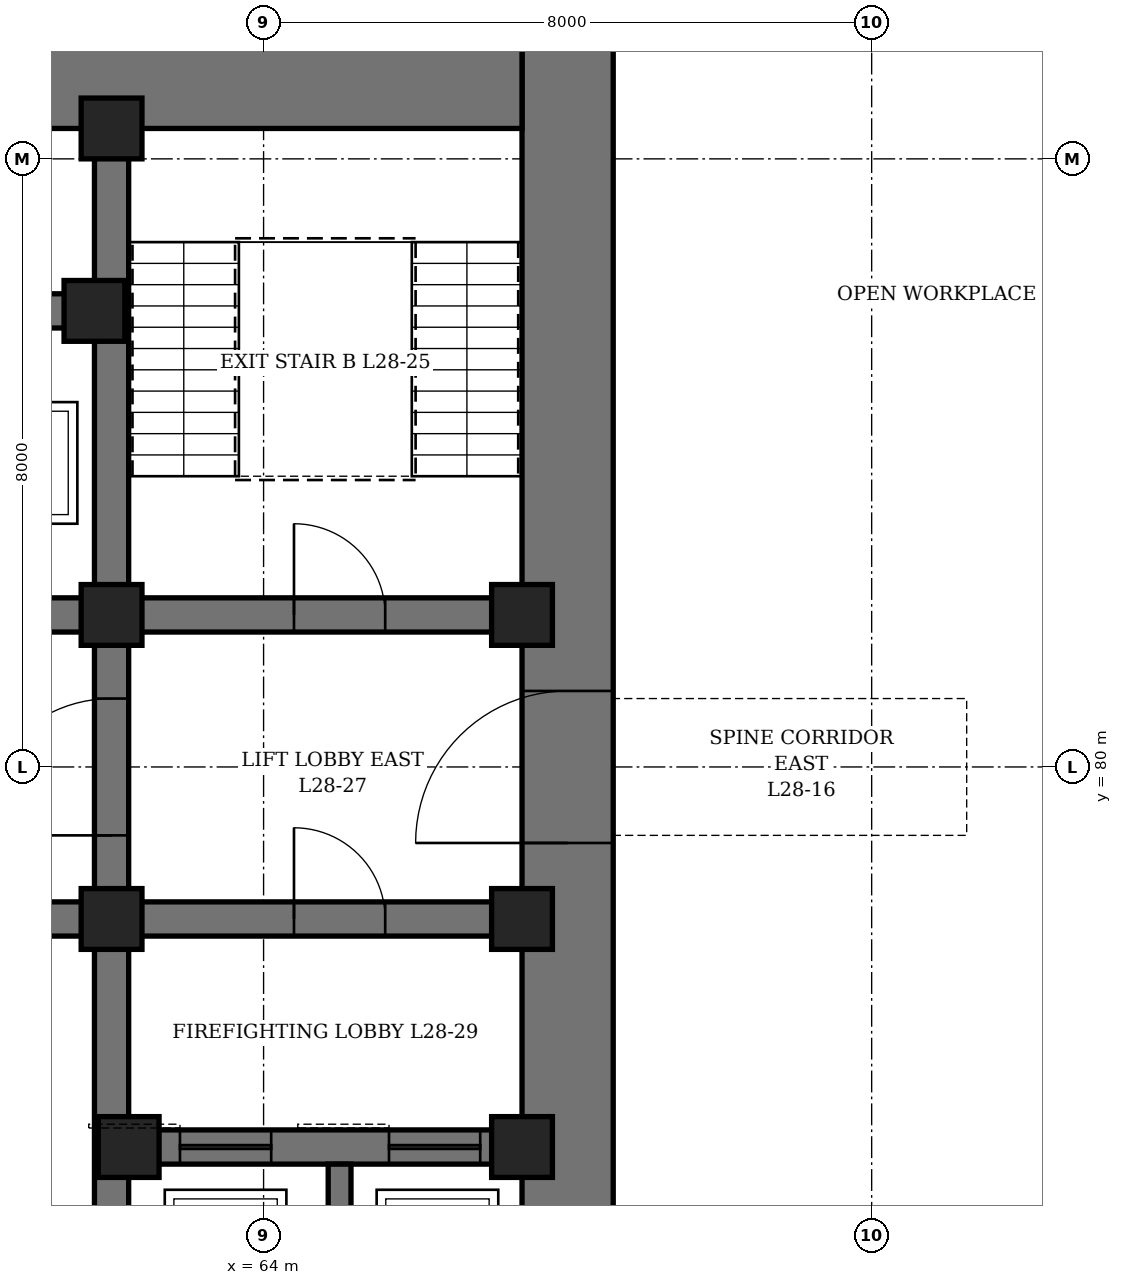
"""IFC4 building model, lengths in metres.
Left out: names, types, materials, properties, quantities, classifications, styles, units other than length and angle.
Written with IfcOpenShell. Run it as: python <this file> out.ifc"""

import sys

from ifc_helpers import new_model, si_unit, direction, frame, frame_2d, origin, origin_2d, place, context, subcontext, project, spatial, rectangle, hollow_rectangle, extrude, element, fill, save


model = new_model("IFC4")
c1 = context("Model", 3, precision=1e-05, world=origin(), true_north=direction((0.0, 1.0)))
c2 = subcontext(c1, "Body", "Model", "MODEL_VIEW")
j1 = project(units=[si_unit("LENGTHUNIT", "METRE"), si_unit("PLANEANGLEUNIT", "RADIAN")], contexts=[c1])
p1 = place(None, origin())
s1 = spatial("IfcSite", under=j1, at=p1, CompositionType="ELEMENT")
p2 = place(p1, origin())
s2 = spatial("IfcBuilding", under=s1, at=p2, CompositionType="ELEMENT")
p3 = place(p2, frame((0.0, 0.0, 129.1)))
s3 = spatial("IfcBuildingStorey", under=s2, at=p3, CompositionType="ELEMENT", Elevation=129.1)
p4 = place(p3, frame((68.0, 70.4, 0.0), z_axis=(0.0, 0.0, 1.0), x_axis=(0.0, 1.0, 0.0)))
e1 = element("IfcWall", 1, at=p4, inside=s3, PredefinedType="SHEAR", context=c2, shape_type="SweptSolid", body=[
    extrude(rectangle(XDim=19.2, YDim=1.2, at=frame_2d((9.6, 0.0))), origin(), (0.0, 0.0, 1.0), 4.2),
])
p5 = place(p4, frame((8.6, 0.0, 0.0)))
e2 = element("IfcOpeningElement", 2, at=p5, cuts=e1, PredefinedType="OPENING", context=c2, shape_type="SweptSolid", body=[
    extrude(rectangle(XDim=2.0, YDim=2.4, at=frame_2d((1.0, 1.2))), frame((0.0, 0.61, 0.0), z_axis=(0.0, -1.0, 0.0), x_axis=(1.0, 0.0, 0.0)), (0.0, 0.0, 1.0), 1.22),
])
p6 = place(p3, frame((44.6, 89.0, 0.0), z_axis=(0.0, 0.0, 1.0), x_axis=(1.0, 0.0, 0.0)))
e3 = element("IfcWall", 3, at=p6, inside=s3, PredefinedType="SHEAR", context=c2, shape_type="SweptSolid", body=[
    extrude(rectangle(XDim=22.8, YDim=1.2, at=frame_2d((11.4, 0.0))), origin(), (0.0, 0.0, 1.0), 4.2),
])
p7 = place(p6, frame((7.9, 0.0, 0.0)))
e4 = element("IfcOpeningElement", 4, at=p7, cuts=e3, PredefinedType="OPENING", context=c2, shape_type="SweptSolid", body=[
    extrude(rectangle(XDim=1.0, YDim=2.1, at=frame_2d((0.5, 1.05))), frame((0.0, 0.61, 0.0), z_axis=(0.0, -1.0, 0.0), x_axis=(1.0, 0.0, 0.0)), (0.0, 0.0, 1.0), 1.22),
])
p8 = place(p6, frame((12.025, 0.0, 0.0)))
e5 = element("IfcOpeningElement", 5, at=p8, cuts=e3, PredefinedType="OPENING", context=c2, shape_type="SweptSolid", body=[
    extrude(rectangle(XDim=0.9, YDim=2.1, at=frame_2d((0.45, 1.05))), frame((0.0, 0.61, 0.0), z_axis=(0.0, -1.0, 0.0), x_axis=(1.0, 0.0, 0.0)), (0.0, 0.0, 1.0), 1.22),
])
p9 = place(p6, frame((13.962, 0.0, 0.0)))
e6 = element("IfcOpeningElement", 6, at=p9, cuts=e3, PredefinedType="OPENING", context=c2, shape_type="SweptSolid", body=[
    extrude(rectangle(XDim=0.9, YDim=2.1, at=frame_2d((0.45, 1.05))), frame((0.0, 0.61, 0.0), z_axis=(0.0, -1.0, 0.0), x_axis=(1.0, 0.0, 0.0)), (0.0, 0.0, 1.0), 1.22),
])
p10 = place(p3, frame((62.0, 71.6, 0.0), z_axis=(0.0, 0.0, 1.0), x_axis=(0.0, 1.0, 0.0)))
e7 = element("IfcWall", 7, at=p10, inside=s3, PredefinedType="SHEAR", context=c2, shape_type="SweptSolid", body=[
    extrude(rectangle(XDim=16.8, YDim=0.45, at=frame_2d((8.4, 0.0))), origin(), (0.0, 0.0, 1.0), 4.2),
])
p11 = place(p10, frame((7.5, 0.0, 0.0)))
e8 = element("IfcOpeningElement", 8, at=p11, cuts=e7, PredefinedType="OPENING", context=c2, shape_type="SweptSolid", body=[
    extrude(rectangle(XDim=1.8, YDim=2.4, at=frame_2d((0.9, 1.2))), frame((0.0, 0.235, 0.0), z_axis=(0.0, -1.0, 0.0), x_axis=(1.0, 0.0, 0.0)), (0.0, 0.0, 1.0), 0.47),
])
p12 = place(p3, frame((62.225, 75.0, 0.0), z_axis=(0.0, 0.0, 1.0), x_axis=(1.0, 0.0, 0.0)))
e9 = element("IfcWall", 9, at=p12, inside=s3, PredefinedType="SHEAR", context=c2, shape_type="SweptSolid", body=[
    extrude(rectangle(XDim=5.175, YDim=0.45, at=frame_2d((2.587, 0.0))), origin(), (0.0, 0.0, 1.0), 4.2),
])
p13 = place(p12, frame((0.675, 0.0, 0.0)))
e10 = element("IfcOpeningElement", 10, at=p13, cuts=e9, PredefinedType="OPENING", context=c2, shape_type="SweptSolid", body=[
    extrude(rectangle(XDim=1.2, YDim=2.2, at=frame_2d((0.6, 1.1))), frame((0.0, 0.235, 0.0), z_axis=(0.0, -1.0, 0.0), x_axis=(1.0, 0.0, 0.0)), (0.0, 0.0, 1.0), 0.47),
])
p14 = place(p12, frame((3.425, 0.0, 0.0)))
e11 = element("IfcOpeningElement", 11, at=p14, cuts=e9, PredefinedType="OPENING", context=c2, shape_type="SweptSolid", body=[
    extrude(rectangle(XDim=1.2, YDim=2.2, at=frame_2d((0.6, 1.1))), frame((0.0, 0.235, 0.0), z_axis=(0.0, -1.0, 0.0), x_axis=(1.0, 0.0, 0.0)), (0.0, 0.0, 1.0), 0.47),
])
p15 = place(p3, frame((62.225, 78.0, 0.0), z_axis=(0.0, 0.0, 1.0), x_axis=(1.0, 0.0, 0.0)))
e12 = element("IfcWall", 12, at=p15, inside=s3, PredefinedType="SHEAR", context=c2, shape_type="SweptSolid", body=[
    extrude(rectangle(XDim=5.175, YDim=0.45, at=frame_2d((2.587, 0.0))), origin(), (0.0, 0.0, 1.0), 4.2),
])
p16 = place(p15, frame((2.175, 0.0, 0.0)))
e13 = element("IfcOpeningElement", 13, at=p16, cuts=e12, PredefinedType="OPENING", context=c2, shape_type="SweptSolid", body=[
    extrude(rectangle(XDim=1.2, YDim=2.1, at=frame_2d((0.6, 1.05))), frame((0.0, 0.235, 0.0), z_axis=(0.0, -1.0, 0.0), x_axis=(1.0, 0.0, 0.0)), (0.0, 0.0, 1.0), 0.47),
])
p17 = place(p3, frame((62.225, 82.0, 0.0), z_axis=(0.0, 0.0, 1.0), x_axis=(1.0, 0.0, 0.0)))
e14 = element("IfcWall", 14, at=p17, inside=s3, PredefinedType="SHEAR", context=c2, shape_type="SweptSolid", body=[
    extrude(rectangle(XDim=5.175, YDim=0.45, at=frame_2d((2.587, 0.0))), origin(), (0.0, 0.0, 1.0), 4.2),
])
p18 = place(p17, frame((2.175, 0.0, 0.0)))
e15 = element("IfcOpeningElement", 15, at=p18, cuts=e14, PredefinedType="OPENING", context=c2, shape_type="SweptSolid", body=[
    extrude(rectangle(XDim=1.2, YDim=2.1, at=frame_2d((0.6, 1.05))), frame((0.0, 0.235, 0.0), z_axis=(0.0, -1.0, 0.0), x_axis=(1.0, 0.0, 0.0)), (0.0, 0.0, 1.0), 0.47),
])
p19 = place(p3, frame((50.225, 78.0, 0.0), z_axis=(0.0, 0.0, 1.0), x_axis=(1.0, 0.0, 0.0)))
e16 = element("IfcWall", 16, at=p19, inside=s3, PredefinedType="SHEAR", context=c2, shape_type="SweptSolid", body=[
    extrude(rectangle(XDim=11.55, YDim=0.45, at=frame_2d((5.775, 0.0))), origin(), (0.0, 0.0, 1.0), 4.2),
])
p20 = place(p19, frame((0.825, 0.0, 0.0)))
e17 = element("IfcOpeningElement", 17, at=p20, cuts=e16, PredefinedType="OPENING", context=c2, shape_type="SweptSolid", body=[
    extrude(rectangle(XDim=0.9, YDim=2.1, at=frame_2d((0.45, 1.05))), frame((0.0, 0.235, 0.0), z_axis=(0.0, -1.0, 0.0), x_axis=(1.0, 0.0, 0.0)), (0.0, 0.0, 1.0), 0.47),
])
p21 = place(p19, frame((3.825, 0.0, 0.0)))
e18 = element("IfcOpeningElement", 18, at=p21, cuts=e16, PredefinedType="OPENING", context=c2, shape_type="SweptSolid", body=[
    extrude(rectangle(XDim=0.9, YDim=2.1, at=frame_2d((0.45, 1.05))), frame((0.0, 0.235, 0.0), z_axis=(0.0, -1.0, 0.0), x_axis=(1.0, 0.0, 0.0)), (0.0, 0.0, 1.0), 0.47),
])
p22 = place(p19, frame((6.825, 0.0, 0.0)))
e19 = element("IfcOpeningElement", 19, at=p22, cuts=e16, PredefinedType="OPENING", context=c2, shape_type="SweptSolid", body=[
    extrude(rectangle(XDim=0.9, YDim=2.1, at=frame_2d((0.45, 1.05))), frame((0.0, 0.235, 0.0), z_axis=(0.0, -1.0, 0.0), x_axis=(1.0, 0.0, 0.0)), (0.0, 0.0, 1.0), 0.47),
])
p23 = place(p19, frame((9.825, 0.0, 0.0)))
e20 = element("IfcOpeningElement", 20, at=p23, cuts=e16, PredefinedType="OPENING", context=c2, shape_type="SweptSolid", body=[
    extrude(rectangle(XDim=0.9, YDim=2.1, at=frame_2d((0.45, 1.05))), frame((0.0, 0.235, 0.0), z_axis=(0.0, -1.0, 0.0), x_axis=(1.0, 0.0, 0.0)), (0.0, 0.0, 1.0), 0.47),
])
p24 = place(p3, frame((50.225, 82.0, 0.0), z_axis=(0.0, 0.0, 1.0), x_axis=(1.0, 0.0, 0.0)))
e21 = element("IfcWall", 21, at=p24, inside=s3, PredefinedType="SHEAR", context=c2, shape_type="SweptSolid", body=[
    extrude(rectangle(XDim=11.55, YDim=0.45, at=frame_2d((5.775, 0.0))), origin(), (0.0, 0.0, 1.0), 4.2),
])
p25 = place(p24, frame((0.725, 0.0, 0.0)))
e22 = element("IfcOpeningElement", 22, at=p25, cuts=e21, PredefinedType="OPENING", context=c2, shape_type="SweptSolid", body=[
    extrude(rectangle(XDim=1.1, YDim=2.2, at=frame_2d((0.55, 1.1))), frame((0.0, 0.235, 0.0), z_axis=(0.0, -1.0, 0.0), x_axis=(1.0, 0.0, 0.0)), (0.0, 0.0, 1.0), 0.47),
])
p26 = place(p24, frame((3.725, 0.0, 0.0)))
e23 = element("IfcOpeningElement", 23, at=p26, cuts=e21, PredefinedType="OPENING", context=c2, shape_type="SweptSolid", body=[
    extrude(rectangle(XDim=1.1, YDim=2.2, at=frame_2d((0.55, 1.1))), frame((0.0, 0.235, 0.0), z_axis=(0.0, -1.0, 0.0), x_axis=(1.0, 0.0, 0.0)), (0.0, 0.0, 1.0), 0.47),
])
p27 = place(p24, frame((6.725, 0.0, 0.0)))
e24 = element("IfcOpeningElement", 24, at=p27, cuts=e21, PredefinedType="OPENING", context=c2, shape_type="SweptSolid", body=[
    extrude(rectangle(XDim=1.1, YDim=2.2, at=frame_2d((0.55, 1.1))), frame((0.0, 0.235, 0.0), z_axis=(0.0, -1.0, 0.0), x_axis=(1.0, 0.0, 0.0)), (0.0, 0.0, 1.0), 0.47),
])
p28 = place(p24, frame((9.725, 0.0, 0.0)))
e25 = element("IfcOpeningElement", 25, at=p28, cuts=e21, PredefinedType="OPENING", context=c2, shape_type="SweptSolid", body=[
    extrude(rectangle(XDim=1.1, YDim=2.2, at=frame_2d((0.55, 1.1))), frame((0.0, 0.235, 0.0), z_axis=(0.0, -1.0, 0.0), x_axis=(1.0, 0.0, 0.0)), (0.0, 0.0, 1.0), 0.47),
])
p29 = place(p3, frame((50.225, 86.0, 0.0), z_axis=(0.0, 0.0, 1.0), x_axis=(1.0, 0.0, 0.0)))
e26 = element("IfcWall", 26, at=p29, inside=s3, PredefinedType="SHEAR", context=c2, shape_type="SweptSolid", body=[
    extrude(rectangle(XDim=11.55, YDim=0.45, at=frame_2d((5.775, 0.0))), origin(), (0.0, 0.0, 1.0), 4.2),
])
p30 = place(p3, frame((65.0, 71.6, 0.0), z_axis=(0.0, 0.0, 1.0), x_axis=(0.0, 1.0, 0.0)))
e27 = element("IfcWall", 27, at=p30, inside=s3, PredefinedType="SHEAR", context=c2, shape_type="SweptSolid", body=[
    extrude(rectangle(XDim=3.175, YDim=0.3, at=frame_2d((1.587, 0.0))), origin(), (0.0, 0.0, 1.0), 4.2),
])
for number, where, z_axis, x_axis in (
    (28, (61.775, 86.0, 0.0), (0.0, 0.0, 1.0), (1.0, 0.0, 0.0)),
    (29, (62.0, 78.0, 0.0), (0.0, 0.0, 1.0), (1.0, 0.0, 0.0)),
    (30, (62.0, 82.0, 0.0), (0.0, 0.0, 1.0), (1.0, 0.0, 0.0)),
    (31, (62.0, 88.4, 0.0), (0.0, 0.0, 1.0), (1.0, 0.0, 0.0)),
    (32, (62.225, 75.0, 0.0), (0.0, 0.0, 1.0), (1.0, 0.0, 0.0)),
    (33, (67.4, 75.0, 0.0), (0.0, 0.0, 1.0), (1.0, 0.0, 0.0)),
    (34, (67.4, 78.0, 0.0), (0.0, 0.0, 1.0), (1.0, 0.0, 0.0)),
    (35, (67.4, 82.0, 0.0), (0.0, 0.0, 1.0), (1.0, 0.0, 0.0)),
):
    element("IfcColumn", number, at=place(p3, frame(where, z_axis=z_axis, x_axis=x_axis)), inside=s3, PredefinedType="COLUMN", context=c2, shape_type="SweptSolid", body=[
        extrude(hollow_rectangle(XDim=0.8, YDim=0.8, WallThickness=0.1, at=origin_2d()), origin(), (0.0, 0.0, 1.0), 4.2),
    ])
p31 = place(p18, origin())
e36 = element("IfcDoor", 36, at=p31, inside=s3, OperationType="SINGLE_SWING_LEFT", PredefinedType="DOOR", context=c2, shape_type="SweptSolid", body=[
    extrude(rectangle(XDim=1.2, YDim=2.1, at=frame_2d((0.6, 1.05))), frame((0.0, 0.225, 0.0), z_axis=(0.0, -1.0, 0.0), x_axis=(1.0, 0.0, 0.0)), (0.0, 0.0, 1.0), 0.449),
])
fill(e15, e36)
p32 = place(p5, origin())
e37 = element("IfcDoor", 37, at=p32, inside=s3, OperationType="DOUBLE_DOOR_SINGLE_SWING", PredefinedType="DOOR", context=c2, shape_type="SweptSolid", body=[
    extrude(rectangle(XDim=2.0, YDim=2.4, at=frame_2d((1.0, 1.2))), frame((0.0, 0.35, 0.0), z_axis=(0.0, -1.0, 0.0), x_axis=(1.0, 0.0, 0.0)), (0.0, 0.0, 1.0), 0.7),
])
fill(e2, e37)
p33 = place(p11, origin())
e38 = element("IfcDoor", 38, at=p33, inside=s3, OperationType="DOUBLE_DOOR_SINGLE_SWING", PredefinedType="DOOR", context=c2, shape_type="SweptSolid", body=[
    extrude(rectangle(XDim=1.8, YDim=2.4, at=frame_2d((0.9, 1.2))), frame((0.0, 0.225, 0.0), z_axis=(0.0, -1.0, 0.0), x_axis=(1.0, 0.0, 0.0)), (0.0, 0.0, 1.0), 0.449),
])
fill(e8, e38)
p34 = place(p16, origin())
e39 = element("IfcDoor", 39, at=p34, inside=s3, OperationType="SINGLE_SWING_RIGHT", PredefinedType="DOOR", context=c2, shape_type="SweptSolid", body=[
    extrude(rectangle(XDim=1.2, YDim=2.1, at=frame_2d((0.6, 1.05))), frame((0.0, 0.225, 0.0), z_axis=(0.0, -1.0, 0.0), x_axis=(1.0, 0.0, 0.0)), (0.0, 0.0, 1.0), 0.449),
])
fill(e13, e39)
p35 = place(p13, origin())
e40 = element("IfcDoor", 40, at=p35, inside=s3, OperationType="SLIDING_TO_LEFT", PredefinedType="DOOR", context=c2, shape_type="SweptSolid", body=[
    extrude(rectangle(XDim=1.2, YDim=2.2, at=frame_2d((0.6, 1.1))), frame((0.0, 0.225, 0.0), z_axis=(0.0, -1.0, 0.0), x_axis=(1.0, 0.0, 0.0)), (0.0, 0.0, 1.0), 0.449),
])
fill(e10, e40)
p36 = place(p14, origin())
e41 = element("IfcDoor", 41, at=p36, inside=s3, OperationType="SLIDING_TO_LEFT", PredefinedType="DOOR", context=c2, shape_type="SweptSolid", body=[
    extrude(rectangle(XDim=1.2, YDim=2.2, at=frame_2d((0.6, 1.1))), frame((0.0, 0.225, 0.0), z_axis=(0.0, -1.0, 0.0), x_axis=(1.0, 0.0, 0.0)), (0.0, 0.0, 1.0), 0.449),
])
fill(e11, e41)
save(model, sys.argv[1])
